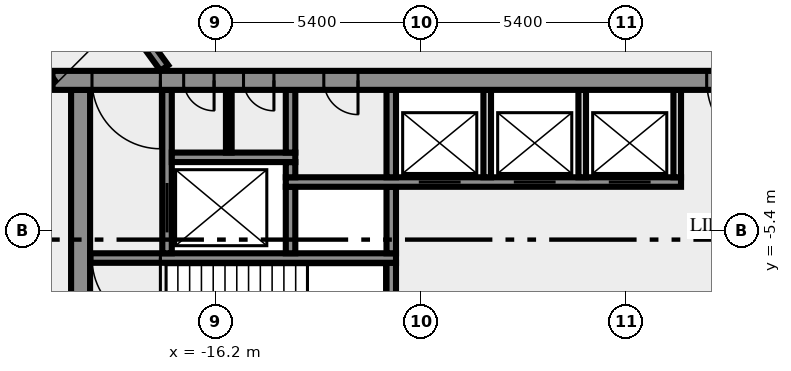
"""IFC4 building model, lengths in metres.
Left out: names, types, materials, properties, quantities, classifications, styles, units other than length and angle.
Written with IfcOpenShell. Run it as: python <this file> out.ifc"""

import sys

from ifc_helpers import new_model, si_unit, direction, frame, frame_2d, origin, place, context, subcontext, project, spatial, rectangle, extrude, element, fill, save


model = new_model("IFC4")
c1 = context("Model", 3, precision=1e-05, world=origin(), true_north=direction((0.0, 1.0)))
c2 = subcontext(c1, "Body", "Model", "MODEL_VIEW")
j1 = project(units=[si_unit("LENGTHUNIT", "METRE"), si_unit("PLANEANGLEUNIT", "RADIAN")], contexts=[c1])
p1 = place(None, origin())
s1 = spatial("IfcSite", under=j1, at=p1, CompositionType="ELEMENT")
p2 = place(p1, origin())
s2 = spatial("IfcBuilding", under=s1, at=p2, CompositionType="ELEMENT")
p3 = place(p2, frame((0.0, 0.0, 31.0)))
s3 = spatial("IfcBuildingStorey", under=s2, at=p3, CompositionType="ELEMENT", Elevation=31.0)
p4 = place(p3, frame((-19.75, -10.5, 0.0), z_axis=(0.0, 0.0, 1.0), x_axis=(0.0, 1.0, 0.0)))
e1 = element("IfcWall", 1, at=p4, inside=s3, PredefinedType="SHEAR", context=c2, shape_type="SweptSolid", body=[
    extrude(rectangle(XDim=8.8, YDim=0.5, at=frame_2d((4.4, 0.0))), origin(), (0.0, 0.0, 1.0), 3.65),
])
p5 = place(p3, frame((-11.575, -7.25, 0.0), z_axis=(0.0, 0.0, 1.0), x_axis=(0.0, 1.0, 0.0)))
e2 = element("IfcWall", 2, at=p5, inside=s3, PredefinedType="SHEAR", context=c2, shape_type="SweptSolid", body=[
    extrude(rectangle(XDim=1.0, YDim=0.25, at=frame_2d((0.5, 0.0))), origin(), (0.0, 0.0, 1.0), 3.65),
])
p6 = place(p3, frame((-11.45, -6.125, 0.0), z_axis=(0.0, 0.0, 1.0), x_axis=(-1.0, 0.0, 0.0)))
e3 = element("IfcWall", 3, at=p6, inside=s3, PredefinedType="SHEAR", context=c2, shape_type="SweptSolid", body=[
    extrude(rectangle(XDim=8.05, YDim=0.25, at=frame_2d((4.025, 0.0))), origin(), (0.0, 0.0, 1.0), 3.65),
])
p7 = place(p6, frame((6.2, 0.0, 0.0)))
e4 = element("IfcOpeningElement", 4, at=p7, cuts=e3, PredefinedType="OPENING", context=c2, shape_type="SweptSolid", body=[
    extrude(rectangle(XDim=1.8, YDim=2.1, at=frame_2d((0.9, 1.05))), frame((0.0, 0.135, 0.0), z_axis=(0.0, -1.0, 0.0), x_axis=(1.0, 0.0, 0.0)), (0.0, 0.0, 1.0), 0.27),
])
p8 = place(p3, frame((-17.475, -6.0, 0.0), z_axis=(0.0, 0.0, 1.0), x_axis=(0.0, 1.0, 0.0)))
e5 = element("IfcWall", 5, at=p8, inside=s3, PredefinedType="SHEAR", context=c2, shape_type="SweptSolid", body=[
    extrude(rectangle(XDim=4.3, YDim=0.25, at=frame_2d((2.15, 0.0))), origin(), (0.0, 0.0, 1.0), 3.65),
])
p9 = place(p8, frame((0.55, 0.0, 0.0)))
e6 = element("IfcOpeningElement", 6, at=p9, cuts=e5, PredefinedType="OPENING", context=c2, shape_type="SweptSolid", body=[
    extrude(rectangle(XDim=1.3, YDim=2.1, at=frame_2d((0.65, 1.05))), frame((0.0, 0.135, 0.0), z_axis=(0.0, -1.0, 0.0), x_axis=(1.0, 0.0, 0.0)), (0.0, 0.0, 1.0), 0.27),
])
for number, where, z_axis, x_axis in (
    (7, (-14.225, -6.0, 0.0), (0.0, 0.0, 1.0), (0.0, 1.0, 0.0)),
    (8, (-11.575, -6.0, 0.0), (0.0, 0.0, 1.0), (0.0, 1.0, 0.0)),
):
    element("IfcWall", number, at=place(p3, frame(where, z_axis=z_axis, x_axis=x_axis)), inside=s3, PredefinedType="SHEAR", context=c2, shape_type="SweptSolid", body=[
        extrude(rectangle(XDim=1.75, YDim=0.25, at=frame_2d((0.875, 0.0))), origin(), (0.0, 0.0, 1.0), 3.65),
    ])
p10 = place(p3, frame((-14.35, -4.125, 0.0), z_axis=(0.0, 0.0, 1.0), x_axis=(1.0, 0.0, 0.0)))
e9 = element("IfcWall", 9, at=p10, inside=s3, PredefinedType="SHEAR", context=c2, shape_type="SweptSolid", body=[
    extrude(rectangle(XDim=10.4, YDim=0.25, at=frame_2d((5.2, 0.0))), origin(), (0.0, 0.0, 1.0), 3.65),
])
p11 = place(p10, frame((3.5, 0.0, 0.0)))
e10 = element("IfcOpeningElement", 10, at=p11, cuts=e9, PredefinedType="OPENING", context=c2, shape_type="SweptSolid", body=[
    extrude(rectangle(XDim=1.1, YDim=2.1, at=frame_2d((0.55, 1.05))), frame((0.0, 0.135, 0.0), z_axis=(0.0, -1.0, 0.0), x_axis=(1.0, 0.0, 0.0)), (0.0, 0.0, 1.0), 0.27),
])
p12 = place(p10, frame((6.0, 0.0, 0.0)))
e11 = element("IfcOpeningElement", 11, at=p12, cuts=e9, PredefinedType="OPENING", context=c2, shape_type="SweptSolid", body=[
    extrude(rectangle(XDim=1.1, YDim=2.1, at=frame_2d((0.55, 1.05))), frame((0.0, 0.135, 0.0), z_axis=(0.0, -1.0, 0.0), x_axis=(1.0, 0.0, 0.0)), (0.0, 0.0, 1.0), 0.27),
])
p13 = place(p10, frame((8.5, 0.0, 0.0)))
e12 = element("IfcOpeningElement", 12, at=p13, cuts=e9, PredefinedType="OPENING", context=c2, shape_type="SweptSolid", body=[
    extrude(rectangle(XDim=1.1, YDim=2.1, at=frame_2d((0.55, 1.05))), frame((0.0, 0.135, 0.0), z_axis=(0.0, -1.0, 0.0), x_axis=(1.0, 0.0, 0.0)), (0.0, 0.0, 1.0), 0.27),
])
p14 = place(p3, frame((-14.225, -4.0, 0.0), z_axis=(0.0, 0.0, 1.0), x_axis=(0.0, 1.0, 0.0)))
e13 = element("IfcWall", 13, at=p14, inside=s3, PredefinedType="SHEAR", context=c2, shape_type="SweptSolid", body=[
    extrude(rectangle(XDim=0.4, YDim=0.25, at=frame_2d((0.2, 0.0))), origin(), (0.0, 0.0, 1.0), 3.65),
])
p15 = place(p3, frame((-11.575, -4.0, 0.0), z_axis=(0.0, 0.0, 1.0), x_axis=(0.0, 1.0, 0.0)))
e14 = element("IfcWall", 14, at=p15, inside=s3, PredefinedType="SHEAR", context=c2, shape_type="SweptSolid", body=[
    extrude(rectangle(XDim=2.3, YDim=0.25, at=frame_2d((1.15, 0.0))), origin(), (0.0, 0.0, 1.0), 3.65),
])
for number, where, z_axis, x_axis in (
    (15, (-9.05, -4.0, 0.0), (0.0, 0.0, 1.0), (0.0, 1.0, 0.0)),
    (16, (-6.55, -4.0, 0.0), (0.0, 0.0, 1.0), (0.0, 1.0, 0.0)),
    (17, (-4.05, -4.0, 0.0), (0.0, 0.0, 1.0), (0.0, 1.0, 0.0)),
):
    element("IfcWall", number, at=place(p3, frame(where, z_axis=z_axis, x_axis=x_axis)), inside=s3, PredefinedType="SOLIDWALL", context=c2, shape_type="SweptSolid", body=[
        extrude(rectangle(XDim=2.3, YDim=0.2, at=frame_2d((1.15, 0.0))), origin(), (0.0, 0.0, 1.0), 3.65),
    ])
p16 = place(p3, frame((-17.35, -3.475, 0.0), z_axis=(0.0, 0.0, 1.0), x_axis=(1.0, 0.0, 0.0)))
e18 = element("IfcWall", 18, at=p16, inside=s3, PredefinedType="SHEAR", context=c2, shape_type="SweptSolid", body=[
    extrude(rectangle(XDim=3.25, YDim=0.25, at=frame_2d((1.625, 0.0))), origin(), (0.0, 0.0, 1.0), 3.65),
])
p17 = place(p3, frame((-15.85, -3.35, 0.0), z_axis=(0.0, 0.0, 1.0), x_axis=(0.0, 1.0, 0.0)))
e19 = element("IfcWall", 19, at=p17, inside=s3, PredefinedType="PARTITIONING", context=c2, shape_type="SweptSolid", body=[
    extrude(rectangle(XDim=1.65, YDim=0.15, at=frame_2d((0.825, 0.0))), origin(), (0.0, 0.0, 1.0), 3.65),
])
p18 = place(p3, frame((-14.225, -3.35, 0.0), z_axis=(0.0, 0.0, 1.0), x_axis=(0.0, 1.0, 0.0)))
e20 = element("IfcWall", 20, at=p18, inside=s3, PredefinedType="SHEAR", context=c2, shape_type="SweptSolid", body=[
    extrude(rectangle(XDim=1.65, YDim=0.25, at=frame_2d((0.825, 0.0))), origin(), (0.0, 0.0, 1.0), 3.65),
])
p19 = place(p3, frame((20.49, -1.45, 0.0), z_axis=(0.0, 0.0, 1.0), x_axis=(-1.0, 0.0, 0.0)))
e21 = element("IfcWall", 21, at=p19, inside=s3, PredefinedType="SHEAR", context=c2, shape_type="SweptSolid", body=[
    extrude(rectangle(XDim=40.98, YDim=0.5, at=frame_2d((20.49, 0.0))), origin(), (0.0, 0.0, 1.0), 3.65),
])
p20 = place(p19, frame((38.14, 0.0, 0.0)))
e22 = element("IfcOpeningElement", 22, at=p20, cuts=e21, PredefinedType="OPENING", context=c2, shape_type="SweptSolid", body=[
    extrude(rectangle(XDim=1.8, YDim=2.1, at=frame_2d((0.9, 1.05))), frame((0.0, 0.26, 0.0), z_axis=(0.0, -1.0, 0.0), x_axis=(1.0, 0.0, 0.0)), (0.0, 0.0, 1.0), 0.52),
])
p21 = place(p19, frame((36.728, 0.0, 0.0)))
e23 = element("IfcOpeningElement", 23, at=p21, cuts=e21, PredefinedType="OPENING", context=c2, shape_type="SweptSolid", body=[
    extrude(rectangle(XDim=0.8, YDim=2.1, at=frame_2d((0.4, 1.05))), frame((0.0, 0.26, 0.0), z_axis=(0.0, -1.0, 0.0), x_axis=(1.0, 0.0, 0.0)), (0.0, 0.0, 1.0), 0.52),
])
p22 = place(p19, frame((35.153, 0.0, 0.0)))
e24 = element("IfcOpeningElement", 24, at=p22, cuts=e21, PredefinedType="OPENING", context=c2, shape_type="SweptSolid", body=[
    extrude(rectangle(XDim=0.8, YDim=2.1, at=frame_2d((0.4, 1.05))), frame((0.0, 0.26, 0.0), z_axis=(0.0, -1.0, 0.0), x_axis=(1.0, 0.0, 0.0)), (0.0, 0.0, 1.0), 0.52),
])
p23 = place(p19, frame((32.94, 0.0, 0.0)))
e25 = element("IfcOpeningElement", 25, at=p23, cuts=e21, PredefinedType="OPENING", context=c2, shape_type="SweptSolid", body=[
    extrude(rectangle(XDim=0.9, YDim=2.1, at=frame_2d((0.45, 1.05))), frame((0.0, 0.26, 0.0), z_axis=(0.0, -1.0, 0.0), x_axis=(1.0, 0.0, 0.0)), (0.0, 0.0, 1.0), 0.52),
])
p24 = place(p19, frame((21.765, 0.0, 0.0)))
e26 = element("IfcOpeningElement", 26, at=p24, cuts=e21, PredefinedType="OPENING", context=c2, shape_type="SweptSolid", body=[
    extrude(rectangle(XDim=2.0, YDim=2.1, at=frame_2d((1.0, 1.05))), frame((0.0, 0.26, 0.0), z_axis=(0.0, -1.0, 0.0), x_axis=(1.0, 0.0, 0.0)), (0.0, 0.0, 1.0), 0.52),
])
p25 = place(p19, frame((7.14, 0.0, 0.0)))
e27 = element("IfcOpeningElement", 27, at=p25, cuts=e21, PredefinedType="OPENING", context=c2, shape_type="SweptSolid", body=[
    extrude(rectangle(XDim=0.9, YDim=2.1, at=frame_2d((0.45, 1.05))), frame((0.0, 0.26, 0.0), z_axis=(0.0, -1.0, 0.0), x_axis=(1.0, 0.0, 0.0)), (0.0, 0.0, 1.0), 0.52),
])
p26 = place(p19, frame((4.19, 0.0, 0.0)))
e28 = element("IfcOpeningElement", 28, at=p26, cuts=e21, PredefinedType="OPENING", context=c2, shape_type="SweptSolid", body=[
    extrude(rectangle(XDim=0.9, YDim=2.1, at=frame_2d((0.45, 1.05))), frame((0.0, 0.26, 0.0), z_axis=(0.0, -1.0, 0.0), x_axis=(1.0, 0.0, 0.0)), (0.0, 0.0, 1.0), 0.52),
])
p27 = place(p19, frame((1.04, 0.0, 0.0)))
e29 = element("IfcOpeningElement", 29, at=p27, cuts=e21, PredefinedType="OPENING", context=c2, shape_type="SweptSolid", body=[
    extrude(rectangle(XDim=1.8, YDim=2.1, at=frame_2d((0.9, 1.05))), frame((0.0, 0.26, 0.0), z_axis=(0.0, -1.0, 0.0), x_axis=(1.0, 0.0, 0.0)), (0.0, 0.0, 1.0), 0.52),
])
p28 = place(p3, frame((-20.531, -1.523, 0.0), z_axis=(0.0, 0.0, 1.0), x_axis=(-0.587784593204, 0.809017473231, 0.0)))
e30 = element("IfcWall", 30, at=p28, inside=s3, PredefinedType="SOLIDWALL", context=c2, shape_type="SweptSolid", body=[
    extrude(rectangle(XDim=44.67, YDim=0.25, at=frame_2d((22.335, 0.0))), origin(), (0.0, 0.0, 1.0), 3.65),
])
p29 = place(p28, frame((30.765, 0.0, 0.0)))
e31 = element("IfcOpeningElement", 31, at=p29, cuts=e30, PredefinedType="OPENING", context=c2, shape_type="SweptSolid", body=[
    extrude(rectangle(XDim=0.9, YDim=2.1, at=frame_2d((0.45, 1.05))), frame((0.0, 0.135, 0.0), z_axis=(0.0, -1.0, 0.0), x_axis=(1.0, 0.0, 0.0)), (0.0, 0.0, 1.0), 0.27),
])
p30 = place(p28, frame((14.316, 0.0, 0.0)))
e32 = element("IfcOpeningElement", 32, at=p30, cuts=e30, PredefinedType="OPENING", context=c2, shape_type="SweptSolid", body=[
    extrude(rectangle(XDim=0.9, YDim=2.1, at=frame_2d((0.45, 1.05))), frame((0.0, 0.135, 0.0), z_axis=(0.0, -1.0, 0.0), x_axis=(1.0, 0.0, 0.0)), (0.0, 0.0, 1.0), 0.27),
])
p31 = place(p28, frame((29.166, 0.0, 0.0)))
e33 = element("IfcOpeningElement", 33, at=p31, cuts=e30, PredefinedType="OPENING", context=c2, shape_type="SweptSolid", body=[
    extrude(rectangle(XDim=0.9, YDim=2.1, at=frame_2d((0.45, 1.05))), frame((0.0, 0.135, 0.0), z_axis=(0.0, -1.0, 0.0), x_axis=(1.0, 0.0, 0.0)), (0.0, 0.0, 1.0), 0.27),
])
p32 = place(p3, frame((-37.232, 25.972, 0.0), z_axis=(0.0, 0.0, 1.0), x_axis=(0.587786323093, -0.809016216391, 0.0)))
e34 = element("IfcWall", 34, at=p32, inside=s3, PredefinedType="SOLIDWALL", context=c2, shape_type="SweptSolid", body=[
    extrude(rectangle(XDim=33.493, YDim=0.25, at=frame_2d((16.747, 0.0))), origin(), (0.0, 0.0, 1.0), 3.65),
])
p33 = place(p32, frame((8.335, 0.0, 0.0)))
e35 = element("IfcOpeningElement", 35, at=p33, cuts=e34, PredefinedType="OPENING", context=c2, shape_type="SweptSolid", body=[
    extrude(rectangle(XDim=0.9, YDim=2.1, at=frame_2d((0.45, 1.05))), frame((0.0, 0.135, 0.0), z_axis=(0.0, -1.0, 0.0), x_axis=(1.0, 0.0, 0.0)), (0.0, 0.0, 1.0), 0.27),
])
p34 = place(p32, frame((29.152, 0.0, 0.0)))
e36 = element("IfcOpeningElement", 36, at=p34, cuts=e34, PredefinedType="OPENING", context=c2, shape_type="SweptSolid", body=[
    extrude(rectangle(XDim=0.9, YDim=2.1, at=frame_2d((0.45, 1.05))), frame((0.0, 0.135, 0.0), z_axis=(0.0, -1.0, 0.0), x_axis=(1.0, 0.0, 0.0)), (0.0, 0.0, 1.0), 0.27),
])
p35 = place(p32, frame((6.735, 0.0, 0.0)))
e37 = element("IfcOpeningElement", 37, at=p35, cuts=e34, PredefinedType="OPENING", context=c2, shape_type="SweptSolid", body=[
    extrude(rectangle(XDim=0.9, YDim=2.1, at=frame_2d((0.45, 1.05))), frame((0.0, 0.135, 0.0), z_axis=(0.0, -1.0, 0.0), x_axis=(1.0, 0.0, 0.0)), (0.0, 0.0, 1.0), 0.27),
])
p36 = place(p7, origin())
e38 = element("IfcDoor", 38, at=p36, inside=s3, OperationType="DOUBLE_DOOR_SINGLE_SWING", PredefinedType="DOOR", context=c2, shape_type="SweptSolid", body=[
    extrude(rectangle(XDim=1.8, YDim=2.1, at=frame_2d((0.9, 1.05))), frame((0.0, 0.025, 0.0), z_axis=(0.0, -1.0, 0.0), x_axis=(1.0, 0.0, 0.0)), (0.0, 0.0, 1.0), 0.05),
])
fill(e4, e38)
p37 = place(p9, origin())
e39 = element("IfcDoor", 39, at=p37, inside=s3, OperationType="DOUBLE_DOOR_SLIDING", PredefinedType="DOOR", context=c2, shape_type="SweptSolid", body=[
    extrude(rectangle(XDim=1.3, YDim=2.1, at=frame_2d((0.65, 1.05))), frame((0.0, 0.025, 0.0), z_axis=(0.0, -1.0, 0.0), x_axis=(1.0, 0.0, 0.0)), (0.0, 0.0, 1.0), 0.05),
])
fill(e6, e39)
p38 = place(p11, origin())
e40 = element("IfcDoor", 40, at=p38, inside=s3, OperationType="DOUBLE_DOOR_SLIDING", PredefinedType="DOOR", context=c2, shape_type="SweptSolid", body=[
    extrude(rectangle(XDim=1.1, YDim=2.1, at=frame_2d((0.55, 1.05))), frame((0.0, 0.025, 0.0), z_axis=(0.0, -1.0, 0.0), x_axis=(1.0, 0.0, 0.0)), (0.0, 0.0, 1.0), 0.05),
])
fill(e10, e40)
p39 = place(p12, origin())
e41 = element("IfcDoor", 41, at=p39, inside=s3, OperationType="DOUBLE_DOOR_SLIDING", PredefinedType="DOOR", context=c2, shape_type="SweptSolid", body=[
    extrude(rectangle(XDim=1.1, YDim=2.1, at=frame_2d((0.55, 1.05))), frame((0.0, 0.025, 0.0), z_axis=(0.0, -1.0, 0.0), x_axis=(1.0, 0.0, 0.0)), (0.0, 0.0, 1.0), 0.05),
])
fill(e11, e41)
p40 = place(p13, origin())
e42 = element("IfcDoor", 42, at=p40, inside=s3, OperationType="DOUBLE_DOOR_SLIDING", PredefinedType="DOOR", context=c2, shape_type="SweptSolid", body=[
    extrude(rectangle(XDim=1.1, YDim=2.1, at=frame_2d((0.55, 1.05))), frame((0.0, 0.025, 0.0), z_axis=(0.0, -1.0, 0.0), x_axis=(1.0, 0.0, 0.0)), (0.0, 0.0, 1.0), 0.05),
])
fill(e12, e42)
p41 = place(p20, origin())
e43 = element("IfcDoor", 43, at=p41, inside=s3, OperationType="DOUBLE_DOOR_SINGLE_SWING", PredefinedType="DOOR", context=c2, shape_type="SweptSolid", body=[
    extrude(rectangle(XDim=1.8, YDim=2.1, at=frame_2d((0.9, 1.05))), frame((0.0, 0.025, 0.0), z_axis=(0.0, -1.0, 0.0), x_axis=(1.0, 0.0, 0.0)), (0.0, 0.0, 1.0), 0.05),
])
fill(e22, e43)
p42 = place(p21, origin())
e44 = element("IfcDoor", 44, at=p42, inside=s3, OperationType="SINGLE_SWING_RIGHT", PredefinedType="DOOR", context=c2, shape_type="SweptSolid", body=[
    extrude(rectangle(XDim=0.8, YDim=2.1, at=frame_2d((0.4, 1.05))), frame((0.0, 0.025, 0.0), z_axis=(0.0, -1.0, 0.0), x_axis=(1.0, 0.0, 0.0)), (0.0, 0.0, 1.0), 0.05),
])
fill(e23, e44)
p43 = place(p22, origin())
e45 = element("IfcDoor", 45, at=p43, inside=s3, OperationType="SINGLE_SWING_RIGHT", PredefinedType="DOOR", context=c2, shape_type="SweptSolid", body=[
    extrude(rectangle(XDim=0.8, YDim=2.1, at=frame_2d((0.4, 1.05))), frame((0.0, 0.025, 0.0), z_axis=(0.0, -1.0, 0.0), x_axis=(1.0, 0.0, 0.0)), (0.0, 0.0, 1.0), 0.05),
])
fill(e24, e45)
p44 = place(p23, origin())
e46 = element("IfcDoor", 46, at=p44, inside=s3, OperationType="SINGLE_SWING_RIGHT", PredefinedType="DOOR", context=c2, shape_type="SweptSolid", body=[
    extrude(rectangle(XDim=0.9, YDim=2.1, at=frame_2d((0.45, 1.05))), frame((0.0, 0.025, 0.0), z_axis=(0.0, -1.0, 0.0), x_axis=(1.0, 0.0, 0.0)), (0.0, 0.0, 1.0), 0.05),
])
fill(e25, e46)
p45 = place(p24, origin())
e47 = element("IfcDoor", 47, at=p45, inside=s3, OperationType="DOUBLE_DOOR_SINGLE_SWING", PredefinedType="DOOR", context=c2, shape_type="SweptSolid", body=[
    extrude(rectangle(XDim=2.0, YDim=2.1, at=frame_2d((1.0, 1.05))), frame((0.0, 0.025, 0.0), z_axis=(0.0, -1.0, 0.0), x_axis=(1.0, 0.0, 0.0)), (0.0, 0.0, 1.0), 0.05),
])
fill(e26, e47)
save(model, sys.argv[1])
